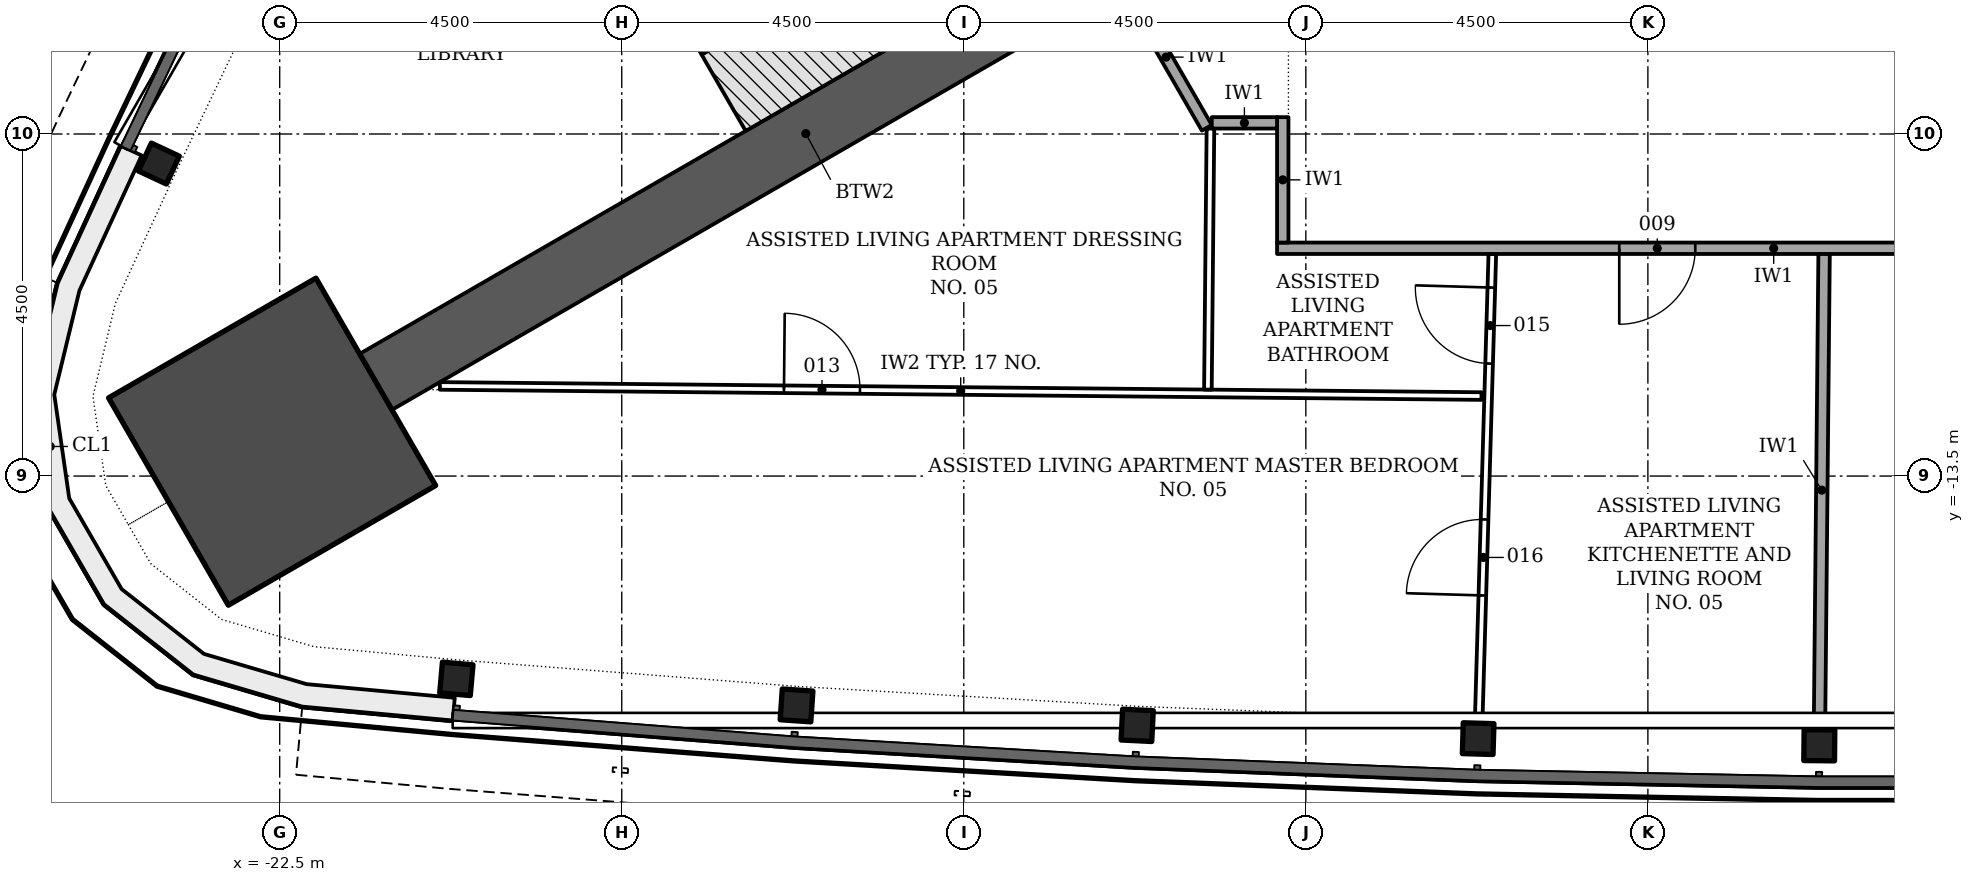
"""IFC4 building model, lengths in metres.
Left out: names, types, materials, properties, quantities, classifications, styles, units other than length and angle.
Written with IfcOpenShell. Run it as: python <this file> out.ifc"""

import sys

from ifc_helpers import new_model, si_unit, direction, frame, frame_2d, origin, origin_2d, place, context, subcontext, project, spatial, polyline, rectangle, i_section, outline, extrude, element, fill, save


model = new_model("IFC4")
c1 = context("Model", 3, precision=1e-05, world=origin(), true_north=direction((0.0, 1.0)))
c2 = subcontext(c1, "Body", "Model", "MODEL_VIEW")
j1 = project(units=[si_unit("LENGTHUNIT", "METRE"), si_unit("PLANEANGLEUNIT", "RADIAN")], contexts=[c1])
p1 = place(None, origin())
s1 = spatial("IfcSite", under=j1, at=p1, CompositionType="ELEMENT")
p2 = place(p1, origin())
s2 = spatial("IfcBuilding", under=s1, at=p2, CompositionType="ELEMENT")
p3 = place(p2, frame((0.0, 0.0, 79.8)))
s3 = spatial("IfcBuildingStorey", under=s2, at=p3, CompositionType="ELEMENT", Elevation=79.8)
p4 = place(p3, frame((-9.922, -5.728, -0.2), z_axis=(0.0, 0.0, 1.0), x_axis=(-0.866026565165, -0.499997988424, 0.0)))
e1 = element("IfcWall", 1, at=p4, inside=s3, PredefinedType="SHEAR", context=c2, shape_type="SweptSolid", body=[
    extrude(rectangle(XDim=13.064, YDim=0.85, at=frame_2d((6.532, 0.0))), origin(), (0.0, 0.0, 1.0), 3.6),
])
p5 = place(p3, frame((-22.6, -13.048, -0.2), z_axis=(0.0, 0.0, 1.0), x_axis=(-0.866025403784, -0.5, 0.0)))
e2 = element("IfcColumn", 2, at=p5, inside=s3, PredefinedType="COLUMN", context=c2, shape_type="SweptSolid", body=[
    extrude(rectangle(XDim=3.15, YDim=3.15, at=origin_2d()), origin(), (0.0, 0.0, 1.0), 3.6),
])
for number, where, z_axis, x_axis in (
    (3, (-24.09, -9.389, -0.2), (0.0, 0.0, 1.0), (-0.422, -0.906, 0.0)),
    (4, (-20.176, -16.168, -0.2), (0.0, 0.0, 1.0), (0.996, -0.088, 0.0)),
    (5, (-15.7, -16.517, -0.2), (0.0, 0.0, 1.0), (0.998, -0.068, 0.0)),
    (6, (-11.219, -16.78, -0.2), (0.0, 0.0, 1.0), (0.999, -0.049, 0.0)),
    (7, (-6.733, -16.954, -0.2), (0.0, 0.0, 1.0), (1.0, -0.029, 0.0)),
    (8, (-2.245, -17.042, -0.2), (0.0, 0.0, 1.0), (1.0, -0.01, 0.0)),
):
    element("IfcColumn", number, at=place(p3, frame(where, z_axis=z_axis, x_axis=x_axis)), inside=s3, PredefinedType="COLUMN", context=c2, shape_type="SweptSolid", body=[
        extrude(i_section(OverallWidth=0.404, OverallDepth=0.406, WebThickness=0.027, FlangeThickness=0.044, FilletRadius=0.015, at=origin_2d()), origin(), (0.0, 0.0, 1.0), 3.6),
    ])
p6 = place(p3, origin())
e9 = element("IfcWall", 9, at=p6, inside=s3, PredefinedType="NOTDEFINED", context=c2, shape_type="SweptSolid", body=[
    extrude(outline(polyline([(-24.588, -9.157), (-25.42, -10.962), (-25.771, -12.414), (-25.558, -13.893), (-24.811, -15.187), (-23.636, -16.111), (-22.203, -16.533), (-20.224, -16.716), (-20.197, -16.417), (-22.146, -16.237), (-23.496, -15.84), (-24.58, -14.987), (-25.269, -13.793), (-25.466, -12.428), (-25.135, -11.061), (-24.316, -9.282), (-24.588, -9.157)])), origin(), (0.0, 0.0, 1.0), 3.3),
])
p7 = place(p3, frame((-10.424, -4.858, -0.2), z_axis=(0.0, 0.0, 1.0), x_axis=(-0.866033125095, -0.499986626058, 0.0)))
e10 = element("IfcWall", 10, at=p7, inside=s3, PredefinedType="SHEAR", context=c2, shape_type="SweptSolid", body=[
    extrude(rectangle(XDim=7.2, YDim=1.161, at=frame_2d((3.6, 0.0))), origin(), (0.0, 0.0, 1.0), 3.6),
])
p8 = place(p3, frame((0.0, 0.0, -0.2)))
e11 = element("IfcWall", 11, at=p8, inside=s3, PredefinedType="SHEAR", context=c2, shape_type="SweptSolid", body=[
    extrude(outline(polyline([(-17.439, -3.907), (-18.025, -6.093), (-16.95, -7.955), (-16.777, -7.855), (-17.81, -6.065), (-17.267, -4.039), (-17.339, -4.081), (-17.339, -4.081), (-17.339, -4.081), (-17.339, -4.081), (-17.339, -4.081), (-17.339, -4.081), (-17.339, -4.081), (-17.339, -4.081), (-17.339, -4.081), (-17.339, -4.081), (-17.339, -4.081), (-17.339, -4.081), (-17.339, -4.081), (-17.339, -4.081), (-17.339, -4.081), (-17.339, -4.081), (-17.339, -4.081), (-17.439, -3.907)])), origin(), (0.0, 0.0, 1.0), 3.6),
])
p9 = place(p3, frame((3.689, -10.503, 0.0), z_axis=(0.0, 0.0, 1.0), x_axis=(-1.0, 0.0, 0.0)))
e12 = element("IfcWall", 12, at=p9, inside=s3, PredefinedType="PARTITIONING", context=c2, shape_type="SweptSolid", body=[
    extrude(rectangle(XDim=13.068, YDim=0.15, at=frame_2d((6.534, 0.0))), origin(), (0.0, 0.0, 1.0), 2.778),
])
p10 = place(p9, frame((7.566, 0.0, 0.0)))
e13 = element("IfcOpeningElement", 13, at=p10, cuts=e12, PredefinedType="OPENING", context=c2, shape_type="SweptSolid", body=[
    extrude(rectangle(XDim=1.0, YDim=2.1, at=frame_2d((0.5, 1.05))), frame((0.0, 0.085, 0.0), z_axis=(0.0, -1.0, 0.0), x_axis=(1.0, 0.0, 0.0)), (0.0, 0.0, 1.0), 0.17),
])
p11 = place(p9, frame((2.5, 0.0, 0.0)))
e14 = element("IfcOpeningElement", 14, at=p11, cuts=e12, PredefinedType="OPENING", context=c2, shape_type="SweptSolid", body=[
    extrude(rectangle(XDim=1.0, YDim=2.1, at=frame_2d((0.5, 1.05))), frame((0.0, 0.085, 0.0), z_axis=(0.0, -1.0, 0.0), x_axis=(1.0, 0.0, 0.0)), (0.0, 0.0, 1.0), 0.17),
])
p12 = place(p3, frame((-11.376, -7.059, 0.0), z_axis=(0.0, 0.0, 1.0), x_axis=(0.500076779081, -0.865981070823, 0.0)))
e15 = element("IfcWall", 15, at=p12, inside=s3, PredefinedType="PARTITIONING", context=c2, shape_type="SweptSolid", body=[
    extrude(rectangle(XDim=2.147, YDim=0.15, at=frame_2d((1.074, 0.0))), origin(), (0.0, 0.0, 1.0), 2.778),
])
p13 = place(p3, frame((-9.304, -10.428, 0.0), z_axis=(0.0, 0.0, 1.0), x_axis=(0.0, 1.0, 0.0)))
e16 = element("IfcWall", 16, at=p13, inside=s3, PredefinedType="PARTITIONING", context=c2, shape_type="SweptSolid", body=[
    extrude(rectangle(XDim=1.65, YDim=0.15, at=frame_2d((0.825, 0.0))), origin(), (0.0, 0.0, 1.0), 3.4),
])
p14 = place(p3, frame((-10.238, -8.853, 0.0), z_axis=(0.0, 0.0, 1.0), x_axis=(1.0, 0.0, 0.0)))
e17 = element("IfcWall", 17, at=p14, inside=s3, PredefinedType="PARTITIONING", context=c2, shape_type="SweptSolid", body=[
    extrude(rectangle(XDim=0.859, YDim=0.15, at=frame_2d((0.43, 0.0))), origin(), (0.0, 0.0, 1.0), 3.4),
])
p15 = place(p3, frame((-2.242, -16.792, 0.0), z_axis=(0.0, 0.0, 1.0), x_axis=(0.009744517475, 0.999952521062, 0.0)))
e18 = element("IfcWall", 18, at=p15, inside=s3, PredefinedType="PARTITIONING", context=c2, shape_type="SweptSolid", body=[
    extrude(rectangle(XDim=6.213, YDim=0.15, at=frame_2d((3.107, 0.0))), origin(), (0.0, 0.0, 1.0), 2.778),
])
p16 = place(p3, frame((-20.393, -12.314, 0.0), z_axis=(0.0, 0.0, 1.0), x_axis=(0.999952690336, -0.009727131588, 0.0)))
e19 = element("IfcWall", 19, at=p16, inside=s3, PredefinedType="PARTITIONING", context=c2, shape_type="SweptSolid", body=[
    extrude(rectangle(XDim=13.704, YDim=0.1, at=frame_2d((6.852, 0.0))), origin(), (0.0, 0.0, 1.0), 2.778),
])
p17 = place(p16, frame((4.527, 0.0, 0.0)))
e20 = element("IfcOpeningElement", 20, at=p17, cuts=e19, PredefinedType="OPENING", context=c2, shape_type="SweptSolid", body=[
    extrude(rectangle(XDim=1.0, YDim=2.1, at=frame_2d((0.5, 1.05))), frame((0.0, 0.06, 0.0), z_axis=(0.0, -1.0, 0.0), x_axis=(1.0, 0.0, 0.0)), (0.0, 0.0, 1.0), 0.12),
])
p18 = place(p3, frame((-6.726, -16.705, 0.0), z_axis=(0.0, 0.0, 1.0), x_axis=(0.029204693092, 0.999573451979, 0.0)))
e21 = element("IfcWall", 21, at=p18, inside=s3, PredefinedType="PARTITIONING", context=c2, shape_type="SweptSolid", body=[
    extrude(rectangle(XDim=6.128, YDim=0.1, at=frame_2d((3.064, 0.0))), origin(), (0.0, 0.0, 1.0), 2.778),
])
p19 = place(p18, frame((4.687, 0.0, 0.0)))
e22 = element("IfcOpeningElement", 22, at=p19, cuts=e21, PredefinedType="OPENING", context=c2, shape_type="SweptSolid", body=[
    extrude(rectangle(XDim=1.0, YDim=2.1, at=frame_2d((0.5, 1.05))), frame((0.0, 0.06, 0.0), z_axis=(0.0, -1.0, 0.0), x_axis=(1.0, 0.0, 0.0)), (0.0, 0.0, 1.0), 0.12),
])
p20 = place(p18, frame((1.635, 0.0, 0.0)))
e23 = element("IfcOpeningElement", 23, at=p20, cuts=e21, PredefinedType="OPENING", context=c2, shape_type="SweptSolid", body=[
    extrude(rectangle(XDim=1.0, YDim=2.1, at=frame_2d((0.5, 1.05))), frame((0.0, 0.06, 0.0), z_axis=(0.0, -1.0, 0.0), x_axis=(1.0, 0.0, 0.0)), (0.0, 0.0, 1.0), 0.12),
])
p21 = place(p3, frame((-10.288, -12.363, 0.0), z_axis=(0.0, 0.0, 1.0), x_axis=(0.009740028537, 0.999952564797, 0.0)))
e24 = element("IfcWall", 24, at=p21, inside=s3, PredefinedType="PARTITIONING", context=c2, shape_type="SweptSolid", body=[
    extrude(rectangle(XDim=3.434, YDim=0.1, at=frame_2d((1.717, 0.0))), origin(), (0.0, 0.0, 1.0), 3.4),
])
p22 = place(p10, origin())
e25 = element("IfcDoor", 25, at=p22, inside=s3, OperationType="SINGLE_SWING_RIGHT", PredefinedType="DOOR", context=c2, shape_type="SweptSolid", body=[
    extrude(rectangle(XDim=1.0, YDim=2.1, at=frame_2d((0.5, 1.05))), frame((0.0, 0.025, 0.0), z_axis=(0.0, -1.0, 0.0), x_axis=(1.0, 0.0, 0.0)), (0.0, 0.0, 1.0), 0.05),
])
fill(e13, e25)
p23 = place(p17, origin())
e26 = element("IfcDoor", 26, at=p23, inside=s3, OperationType="SINGLE_SWING_LEFT", PredefinedType="DOOR", context=c2, shape_type="SweptSolid", body=[
    extrude(rectangle(XDim=1.0, YDim=2.1, at=frame_2d((0.5, 1.05))), frame((0.0, 0.025, 0.0), z_axis=(0.0, -1.0, 0.0), x_axis=(1.0, 0.0, 0.0)), (0.0, 0.0, 1.0), 0.05),
])
fill(e20, e26)
p24 = place(p19, origin())
e27 = element("IfcDoor", 27, at=p24, inside=s3, OperationType="SINGLE_SWING_RIGHT", PredefinedType="DOOR", context=c2, shape_type="SweptSolid", body=[
    extrude(rectangle(XDim=1.0, YDim=2.1, at=frame_2d((0.5, 1.05))), frame((0.0, 0.025, 0.0), z_axis=(0.0, -1.0, 0.0), x_axis=(1.0, 0.0, 0.0)), (0.0, 0.0, 1.0), 0.05),
])
fill(e22, e27)
p25 = place(p20, origin())
e28 = element("IfcDoor", 28, at=p25, inside=s3, OperationType="SINGLE_SWING_LEFT", PredefinedType="DOOR", context=c2, shape_type="SweptSolid", body=[
    extrude(rectangle(XDim=1.0, YDim=2.1, at=frame_2d((0.5, 1.05))), frame((0.0, 0.025, 0.0), z_axis=(0.0, -1.0, 0.0), x_axis=(1.0, 0.0, 0.0)), (0.0, 0.0, 1.0), 0.05),
])
fill(e23, e28)
save(model, sys.argv[1])
